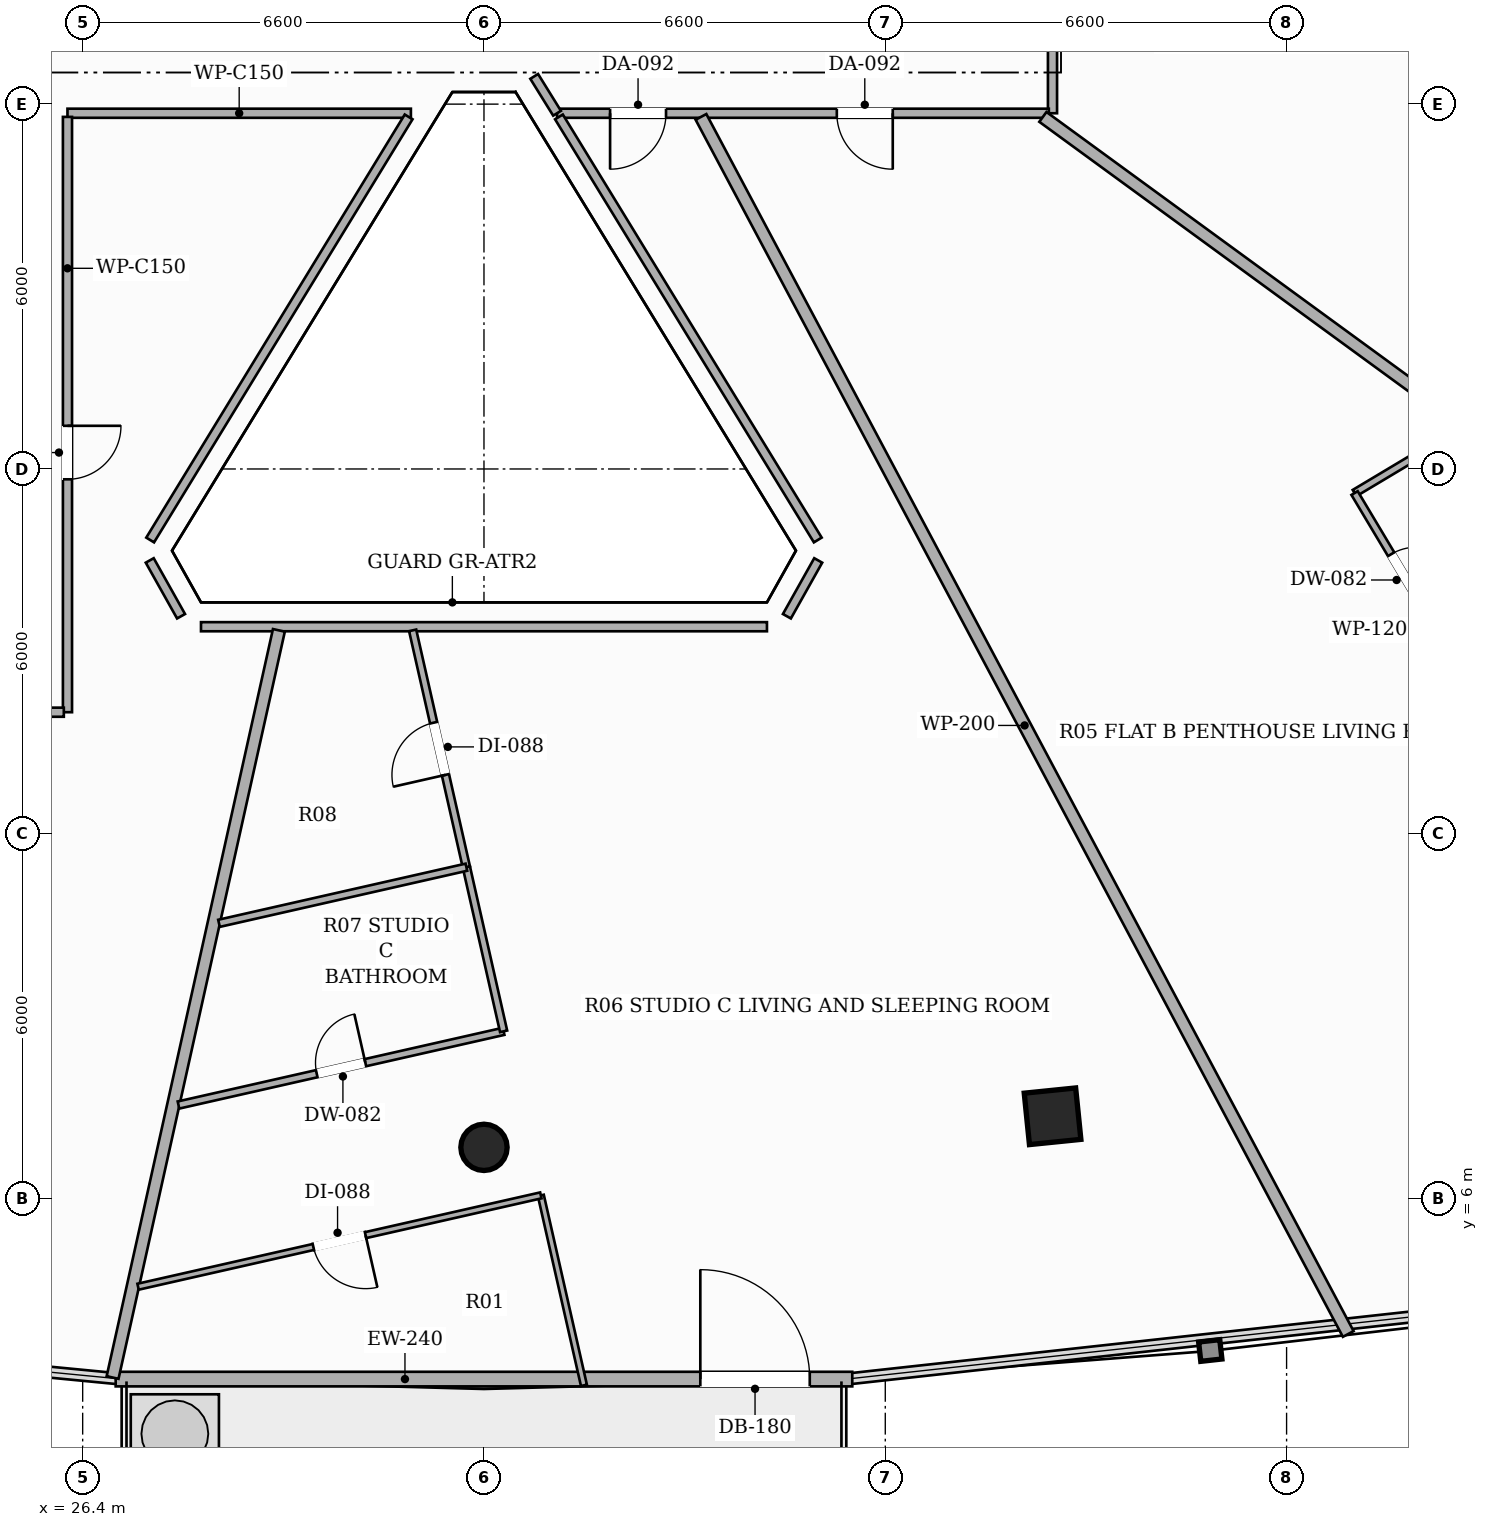
"""IFC4 building model, lengths in metres.
Left out: names, types, materials, properties, quantities, classifications, styles, units other than length and angle.
Written with IfcOpenShell. Run it as: python <this file> out.ifc"""

import sys

from ifc_helpers import new_model, si_unit, direction, frame, frame_2d, origin, origin_2d, place, context, subcontext, project, spatial, rectangle, hollow_rectangle, hollow_circle, extrude, element, fill, save


model = new_model("IFC4")
c1 = context("Model", 3, precision=1e-05, world=origin(), true_north=direction((0.0, 1.0)))
c2 = subcontext(c1, "Body", "Model", "MODEL_VIEW")
j1 = project(units=[si_unit("LENGTHUNIT", "METRE"), si_unit("PLANEANGLEUNIT", "RADIAN")], contexts=[c1])
p1 = place(None, origin())
s1 = spatial("IfcSite", under=j1, at=p1, CompositionType="ELEMENT")
p2 = place(p1, origin())
s2 = spatial("IfcBuilding", under=s1, at=p2, CompositionType="ELEMENT")
p3 = place(p2, frame((0.0, 0.0, 123.2)))
s3 = spatial("IfcBuildingStorey", under=s2, at=p3, CompositionType="ELEMENT", Elevation=123.2)
p4 = place(p3, frame((33.0, 6.844, 0.0), z_axis=(0.0, 0.0, 1.0), x_axis=(1.0, 0.0, 0.0)))
e1 = element("IfcColumn", 1, at=p4, inside=s3, PredefinedType="COLUMN", context=c2, shape_type="SweptSolid", body=[
    extrude(hollow_circle(Radius=0.381, WallThickness=0.022, at=origin_2d()), origin(), (0.0, 0.0, 1.0), 3.3),
])
p5 = place(p3, frame((42.351, 7.355, 0.0), z_axis=(0.0, 0.0, 1.0), x_axis=(0.994880708829, 0.101056297183, 0.0)))
e2 = element("IfcColumn", 2, at=p5, inside=s3, PredefinedType="COLUMN", context=c2, shape_type="SweptSolid", body=[
    extrude(hollow_rectangle(XDim=0.85, YDim=0.85, WallThickness=0.028, at=origin_2d()), origin(), (0.0, 0.0, 1.0), 3.3),
])
p6 = place(p3, frame((26.943, 3.033, 0.0), z_axis=(0.0, 0.0, 1.0), x_axis=(1.0, 0.0, 0.0)))
e3 = element("IfcWall", 3, at=p6, inside=s3, PredefinedType="SOLIDWALL", context=c2, shape_type="SweptSolid", body=[
    extrude(rectangle(XDim=12.114, YDim=0.24, at=frame_2d((6.057, 0.0))), origin(), (0.0, 0.0, 1.0), 2.624),
])
p7 = place(p6, frame((9.615, 0.0, 0.0)))
e4 = element("IfcOpeningElement", 4, at=p7, cuts=e3, PredefinedType="OPENING", context=c2, shape_type="SweptSolid", body=[
    extrude(rectangle(XDim=1.8, YDim=2.2, at=frame_2d((0.9, 1.1))), frame((0.0, 0.13, 0.0), z_axis=(0.0, -1.0, 0.0), x_axis=(1.0, 0.0, 0.0)), (0.0, 0.0, 1.0), 0.26),
])
p8 = place(p3, frame((31.798, 23.85, 0.0), z_axis=(0.0, 0.0, 1.0), x_axis=(-1.0, 0.0, 0.0)))
e5 = element("IfcWall", 5, at=p8, inside=s3, PredefinedType="PARTITIONING", context=c2, shape_type="SweptSolid", body=[
    extrude(rectangle(XDim=5.648, YDim=0.15, at=frame_2d((2.824, 0.0))), origin(), (0.0, 0.0, 1.0), 2.721),
])
p9 = place(p3, frame((26.15, 23.79, 0.0), z_axis=(0.0, 0.0, 1.0), x_axis=(0.0, -1.0, 0.0)))
e6 = element("IfcWall", 6, at=p9, inside=s3, PredefinedType="PARTITIONING", context=c2, shape_type="SweptSolid", body=[
    extrude(rectangle(XDim=9.79, YDim=0.15, at=frame_2d((4.895, 0.0))), origin(), (0.0, 0.0, 1.0), 2.721),
])
p10 = place(p9, frame((5.08, 0.0, 0.0)))
e7 = element("IfcOpeningElement", 7, at=p10, cuts=e6, PredefinedType="OPENING", context=c2, shape_type="SweptSolid", body=[
    extrude(rectangle(XDim=0.88, YDim=2.1, at=frame_2d((0.44, 1.05))), frame((0.0, 0.085, 0.0), z_axis=(0.0, -1.0, 0.0), x_axis=(1.0, 0.0, 0.0)), (0.0, 0.0, 1.0), 0.17),
])
p11 = place(p3, frame((26.09, 14.0, 0.0), z_axis=(0.0, 0.0, 1.0), x_axis=(-1.0, 0.0, 0.0)))
e8 = element("IfcWall", 8, at=p11, inside=s3, PredefinedType="PARTITIONING", context=c2, shape_type="SweptSolid", body=[
    extrude(rectangle(XDim=2.59, YDim=0.15, at=frame_2d((1.295, 0.0))), origin(), (0.0, 0.0, 1.0), 2.721),
])
p12 = place(p3, frame((42.35, 28.34, 0.0), z_axis=(0.0, 0.0, 1.0), x_axis=(0.0, -1.0, 0.0)))
e9 = element("IfcWall", 9, at=p12, inside=s3, PredefinedType="PARTITIONING", context=c2, shape_type="SweptSolid", body=[
    extrude(rectangle(XDim=4.49, YDim=0.15, at=frame_2d((2.245, 0.0))), origin(), (0.0, 0.0, 1.0), 2.721),
])
p13 = place(p12, frame((1.805, 0.0, 0.0)))
e10 = element("IfcOpeningElement", 10, at=p13, cuts=e9, PredefinedType="OPENING", context=c2, shape_type="SweptSolid", body=[
    extrude(rectangle(XDim=0.88, YDim=2.1, at=frame_2d((0.44, 1.05))), frame((0.0, 0.085, 0.0), z_axis=(0.0, -1.0, 0.0), x_axis=(1.0, 0.0, 0.0)), (0.0, 0.0, 1.0), 0.17),
])
p14 = place(p3, frame((42.29, 23.85, 0.0), z_axis=(0.0, 0.0, 1.0), x_axis=(-1.0, 0.0, 0.0)))
e11 = element("IfcWall", 11, at=p14, inside=s3, PredefinedType="PARTITIONING", context=c2, shape_type="SweptSolid", body=[
    extrude(rectangle(XDim=8.088, YDim=0.15, at=frame_2d((4.044, 0.0))), origin(), (0.0, 0.0, 1.0), 2.492),
])
p15 = place(p14, frame((2.567, 0.0, 0.0)))
e12 = element("IfcOpeningElement", 12, at=p15, cuts=e11, PredefinedType="OPENING", context=c2, shape_type="SweptSolid", body=[
    extrude(rectangle(XDim=0.92, YDim=2.15, at=frame_2d((0.46, 1.075))), frame((0.0, 0.085, 0.0), z_axis=(0.0, -1.0, 0.0), x_axis=(1.0, 0.0, 0.0)), (0.0, 0.0, 1.0), 0.17),
])
p16 = place(p14, frame((6.296, 0.0, 0.0)))
e13 = element("IfcOpeningElement", 13, at=p16, cuts=e11, PredefinedType="OPENING", context=c2, shape_type="SweptSolid", body=[
    extrude(rectangle(XDim=0.92, YDim=2.15, at=frame_2d((0.46, 1.075))), frame((0.0, 0.085, 0.0), z_axis=(0.0, -1.0, 0.0), x_axis=(1.0, 0.0, 0.0)), (0.0, 0.0, 1.0), 0.17),
])
p17 = place(p3, frame((34.202, 23.85, 0.0), z_axis=(0.0, 0.0, 1.0), x_axis=(-0.527226500772, 0.849724788907, 0.0)))
e14 = element("IfcWall", 14, at=p17, inside=s3, PredefinedType="PARTITIONING", context=c2, shape_type="SweptSolid", body=[
    extrude(rectangle(XDim=0.713, YDim=0.15, at=frame_2d((0.356, 0.0))), origin(), (0.0, 0.0, 1.0), 3.06),
])
p18 = place(p3, frame((34.233, 23.79, 0.0), z_axis=(0.0, 0.0, 1.0), x_axis=(0.521893040745, -0.853010934292, 0.0)))
e15 = element("IfcWall", 15, at=p18, inside=s3, PredefinedType="PARTITIONING", context=c2, shape_type="SweptSolid", body=[
    extrude(rectangle(XDim=8.157, YDim=0.15, at=frame_2d((4.079, 0.0))), origin(), (0.0, 0.0, 1.0), 2.721),
])
p19 = place(p3, frame((38.497, 16.496, 0.0), z_axis=(0.0, 0.0, 1.0), x_axis=(-0.489281087794, -0.872126147485, 0.0)))
e16 = element("IfcWall", 16, at=p19, inside=s3, PredefinedType="PARTITIONING", context=c2, shape_type="SweptSolid", body=[
    extrude(rectangle(XDim=1.053, YDim=0.15, at=frame_2d((0.526, 0.0))), origin(), (0.0, 0.0, 1.0), 3.06),
])
p20 = place(p3, frame((37.654, 15.406, 0.0), z_axis=(0.0, 0.0, 1.0), x_axis=(-1.0, 0.0, 0.0)))
e17 = element("IfcWall", 17, at=p20, inside=s3, PredefinedType="PARTITIONING", context=c2, shape_type="SweptSolid", body=[
    extrude(rectangle(XDim=9.308, YDim=0.15, at=frame_2d((4.654, 0.0))), origin(), (0.0, 0.0, 1.0), 2.721),
])
p21 = place(p3, frame((28.018, 15.578, 0.0), z_axis=(0.0, 0.0, 1.0), x_axis=(-0.489281087794, 0.872126147485, 0.0)))
e18 = element("IfcWall", 18, at=p21, inside=s3, PredefinedType="PARTITIONING", context=c2, shape_type="SweptSolid", body=[
    extrude(rectangle(XDim=1.053, YDim=0.15, at=frame_2d((0.526, 0.0))), origin(), (0.0, 0.0, 1.0), 3.06),
])
p22 = place(p3, frame((27.51, 16.832, 0.0), z_axis=(0.0, 0.0, 1.0), x_axis=(0.521348270591, 0.853343999072, 0.0)))
e19 = element("IfcWall", 19, at=p22, inside=s3, PredefinedType="PARTITIONING", context=c2, shape_type="SweptSolid", body=[
    extrude(rectangle(XDim=8.154, YDim=0.15, at=frame_2d((4.077, 0.0))), origin(), (0.0, 0.0, 1.0), 2.721),
])
p23 = place(p3, frame((47.214, 3.775, 0.0), z_axis=(0.0, 0.0, 1.0), x_axis=(-0.469567249912, 0.88289670846, 0.0)))
e20 = element("IfcWall", 20, at=p23, inside=s3, PredefinedType="PARTITIONING", context=c2, shape_type="SweptSolid", body=[
    extrude(rectangle(XDim=22.67, YDim=0.2, at=frame_2d((11.335, 0.0))), origin(), (0.0, 0.0, 1.0), 2.413),
])
p24 = place(p3, frame((42.192, 23.79, 0.0), z_axis=(0.0, 0.0, 1.0), x_axis=(0.807710254014, -0.589579634621, 0.0)))
e21 = element("IfcWall", 21, at=p24, inside=s3, PredefinedType="PARTITIONING", context=c2, shape_type="SweptSolid", body=[
    extrude(rectangle(XDim=18.691, YDim=0.2, at=frame_2d((9.346, 0.0))), origin(), (0.0, 0.0, 1.0), 2.413),
])
p25 = place(p3, frame((26.892, 3.059, 0.0), z_axis=(0.0, 0.0, 1.0), x_axis=(0.217267240277, 0.97611215867, 0.0)))
e22 = element("IfcWall", 22, at=p25, inside=s3, PredefinedType="PARTITIONING", context=c2, shape_type="SweptSolid", body=[
    extrude(rectangle(XDim=12.588, YDim=0.2, at=frame_2d((6.294, 0.0))), origin(), (0.0, 0.0, 1.0), 2.413),
])
p26 = place(p3, frame((49.08, 18.657, 0.0), z_axis=(0.0, 0.0, 1.0), x_axis=(-0.858394155401, -0.51299071529, 0.0)))
e23 = element("IfcWall", 23, at=p26, inside=s3, PredefinedType="PARTITIONING", context=c2, shape_type="SweptSolid", body=[
    extrude(rectangle(XDim=2.053, YDim=0.12, at=frame_2d((1.026, 0.0))), origin(), (0.0, 0.0, 1.0), 2.721),
])
p27 = place(p3, frame((47.318, 17.604, 0.0), z_axis=(0.0, 0.0, 1.0), x_axis=(0.51313361254, -0.858308741469, 0.0)))
e24 = element("IfcWall", 24, at=p27, inside=s3, PredefinedType="PARTITIONING", context=c2, shape_type="SweptSolid", body=[
    extrude(rectangle(XDim=3.165, YDim=0.12, at=frame_2d((1.582, 0.0))), origin(), (0.0, 0.0, 1.0), 2.492),
])
p28 = place(p27, frame((1.172, 0.0, 0.0)))
e25 = element("IfcOpeningElement", 25, at=p28, cuts=e24, PredefinedType="OPENING", context=c2, shape_type="SweptSolid", body=[
    extrude(rectangle(XDim=0.82, YDim=2.1, at=frame_2d((0.41, 1.05))), frame((0.0, 0.07, 0.0), z_axis=(0.0, -1.0, 0.0), x_axis=(1.0, 0.0, 0.0)), (0.0, 0.0, 1.0), 0.14),
])
p29 = place(p3, frame((27.976, 7.54, 0.0), z_axis=(0.0, 0.0, 1.0), x_axis=(0.975262605336, 0.221049430295, 0.0)))
e26 = element("IfcWall", 26, at=p29, inside=s3, PredefinedType="PARTITIONING", context=c2, shape_type="SweptSolid", body=[
    extrude(rectangle(XDim=5.483, YDim=0.12, at=frame_2d((2.741, 0.0))), origin(), (0.0, 0.0, 1.0), 2.413),
])
p30 = place(p29, frame((2.331, 0.0, 0.0)))
e27 = element("IfcOpeningElement", 27, at=p30, cuts=e26, PredefinedType="OPENING", context=c2, shape_type="SweptSolid", body=[
    extrude(rectangle(XDim=0.82, YDim=2.1, at=frame_2d((0.41, 1.05))), frame((0.0, 0.07, 0.0), z_axis=(0.0, -1.0, 0.0), x_axis=(1.0, 0.0, 0.0)), (0.0, 0.0, 1.0), 0.14),
])
p31 = place(p3, frame((33.323, 8.752, 0.0), z_axis=(0.0, 0.0, 1.0), x_axis=(-0.221159716637, 0.975237601683, 0.0)))
e28 = element("IfcWall", 28, at=p31, inside=s3, PredefinedType="PARTITIONING", context=c2, shape_type="SweptSolid", body=[
    extrude(rectangle(XDim=2.768, YDim=0.12, at=frame_2d((1.384, 0.0))), origin(), (0.0, 0.0, 1.0), 2.721),
])
p32 = place(p3, frame((32.711, 11.451, 0.0), z_axis=(0.0, 0.0, 1.0), x_axis=(-0.221335761288, 0.975197662413, 0.0)))
e29 = element("IfcWall", 29, at=p32, inside=s3, PredefinedType="PARTITIONING", context=c2, shape_type="SweptSolid", body=[
    extrude(rectangle(XDim=3.994, YDim=0.12, at=frame_2d((1.997, 0.0))), origin(), (0.0, 0.0, 1.0), 2.721),
])
p33 = place(p32, frame((1.557, 0.0, 0.0)))
e30 = element("IfcOpeningElement", 30, at=p33, cuts=e29, PredefinedType="OPENING", context=c2, shape_type="SweptSolid", body=[
    extrude(rectangle(XDim=0.88, YDim=2.1, at=frame_2d((0.44, 1.05))), frame((0.0, 0.07, 0.0), z_axis=(0.0, -1.0, 0.0), x_axis=(1.0, 0.0, 0.0)), (0.0, 0.0, 1.0), 0.14),
])
p34 = place(p3, frame((34.644, 2.93, 0.0), z_axis=(0.0, 0.0, 1.0), x_axis=(-0.22131804383, 0.975201683487, 0.0)))
e31 = element("IfcWall", 31, at=p34, inside=s3, PredefinedType="PARTITIONING", context=c2, shape_type="SweptSolid", body=[
    extrude(rectangle(XDim=3.203, YDim=0.1, at=frame_2d((1.602, 0.0))), origin(), (0.0, 0.0, 1.0), 3.06),
])
p35 = place(p3, frame((33.935, 6.054, 0.0), z_axis=(0.0, 0.0, 1.0), x_axis=(-0.975244308244, -0.221130140952, 0.0)))
e32 = element("IfcWall", 32, at=p35, inside=s3, PredefinedType="PARTITIONING", context=c2, shape_type="SweptSolid", body=[
    extrude(rectangle(XDim=6.792, YDim=0.1, at=frame_2d((3.396, 0.0))), origin(), (0.0, 0.0, 1.0), 3.06),
])
p36 = place(p35, frame((2.956, 0.0, 0.0)))
e33 = element("IfcOpeningElement", 33, at=p36, cuts=e32, PredefinedType="OPENING", context=c2, shape_type="SweptSolid", body=[
    extrude(rectangle(XDim=0.88, YDim=2.1, at=frame_2d((0.44, 1.05))), frame((0.0, 0.06, 0.0), z_axis=(0.0, -1.0, 0.0), x_axis=(1.0, 0.0, 0.0)), (0.0, 0.0, 1.0), 0.12),
])
p37 = place(p3, frame((28.642, 10.528, 0.0), z_axis=(0.0, 0.0, 1.0), x_axis=(0.975230479555, 0.221191120408, 0.0)))
e34 = element("IfcWall", 34, at=p37, inside=s3, PredefinedType="PARTITIONING", context=c2, shape_type="SweptSolid", body=[
    extrude(rectangle(XDim=4.172, YDim=0.12, at=frame_2d((2.086, 0.0))), origin(), (0.0, 0.0, 1.0), 2.721),
])
p38 = place(p7, origin())
e35 = element("IfcDoor", 35, at=p38, inside=s3, OperationType="SINGLE_SWING_LEFT", PredefinedType="DOOR", context=c2, shape_type="SweptSolid", body=[
    extrude(rectangle(XDim=1.8, YDim=2.2, at=frame_2d((0.9, 1.1))), frame((0.0, 0.025, 0.0), z_axis=(0.0, -1.0, 0.0), x_axis=(1.0, 0.0, 0.0)), (0.0, 0.0, 1.0), 0.05),
])
fill(e4, e35)
p39 = place(p15, origin())
e36 = element("IfcDoor", 36, at=p39, inside=s3, OperationType="SINGLE_SWING_LEFT", PredefinedType="DOOR", context=c2, shape_type="SweptSolid", body=[
    extrude(rectangle(XDim=0.92, YDim=2.15, at=frame_2d((0.46, 1.075))), frame((0.0, 0.025, 0.0), z_axis=(0.0, -1.0, 0.0), x_axis=(1.0, 0.0, 0.0)), (0.0, 0.0, 1.0), 0.05),
])
fill(e12, e36)
p40 = place(p28, origin())
e37 = element("IfcDoor", 37, at=p40, inside=s3, OperationType="SINGLE_SWING_RIGHT", PredefinedType="DOOR", context=c2, shape_type="SweptSolid", body=[
    extrude(rectangle(XDim=0.82, YDim=2.1, at=frame_2d((0.41, 1.05))), frame((0.0, 0.025, 0.0), z_axis=(0.0, -1.0, 0.0), x_axis=(1.0, 0.0, 0.0)), (0.0, 0.0, 1.0), 0.05),
])
fill(e25, e37)
p41 = place(p16, origin())
e38 = element("IfcDoor", 38, at=p41, inside=s3, OperationType="SINGLE_SWING_RIGHT", PredefinedType="DOOR", context=c2, shape_type="SweptSolid", body=[
    extrude(rectangle(XDim=0.92, YDim=2.15, at=frame_2d((0.46, 1.075))), frame((0.0, 0.025, 0.0), z_axis=(0.0, -1.0, 0.0), x_axis=(1.0, 0.0, 0.0)), (0.0, 0.0, 1.0), 0.05),
])
fill(e13, e38)
p42 = place(p30, origin())
e39 = element("IfcDoor", 39, at=p42, inside=s3, OperationType="SINGLE_SWING_RIGHT", PredefinedType="DOOR", context=c2, shape_type="SweptSolid", body=[
    extrude(rectangle(XDim=0.82, YDim=2.1, at=frame_2d((0.41, 1.05))), frame((0.0, 0.025, 0.0), z_axis=(0.0, -1.0, 0.0), x_axis=(1.0, 0.0, 0.0)), (0.0, 0.0, 1.0), 0.05),
])
fill(e27, e39)
p43 = place(p33, origin())
e40 = element("IfcDoor", 40, at=p43, inside=s3, OperationType="SINGLE_SWING_LEFT", PredefinedType="DOOR", context=c2, shape_type="SweptSolid", body=[
    extrude(rectangle(XDim=0.88, YDim=2.1, at=frame_2d((0.44, 1.05))), frame((0.0, 0.025, 0.0), z_axis=(0.0, -1.0, 0.0), x_axis=(1.0, 0.0, 0.0)), (0.0, 0.0, 1.0), 0.05),
])
fill(e30, e40)
p44 = place(p36, origin())
e41 = element("IfcDoor", 41, at=p44, inside=s3, OperationType="SINGLE_SWING_LEFT", PredefinedType="DOOR", context=c2, shape_type="SweptSolid", body=[
    extrude(rectangle(XDim=0.88, YDim=2.1, at=frame_2d((0.44, 1.05))), frame((0.0, 0.025, 0.0), z_axis=(0.0, -1.0, 0.0), x_axis=(1.0, 0.0, 0.0)), (0.0, 0.0, 1.0), 0.05),
])
fill(e33, e41)
p45 = place(p10, origin())
e42 = element("IfcDoor", 42, at=p45, inside=s3, OperationType="SINGLE_SWING_LEFT", PredefinedType="DOOR", context=c2, shape_type="SweptSolid", body=[
    extrude(rectangle(XDim=0.88, YDim=2.1, at=frame_2d((0.44, 1.05))), frame((0.0, 0.025, 0.0), z_axis=(0.0, -1.0, 0.0), x_axis=(1.0, 0.0, 0.0)), (0.0, 0.0, 1.0), 0.05),
])
fill(e7, e42)
save(model, sys.argv[1])
